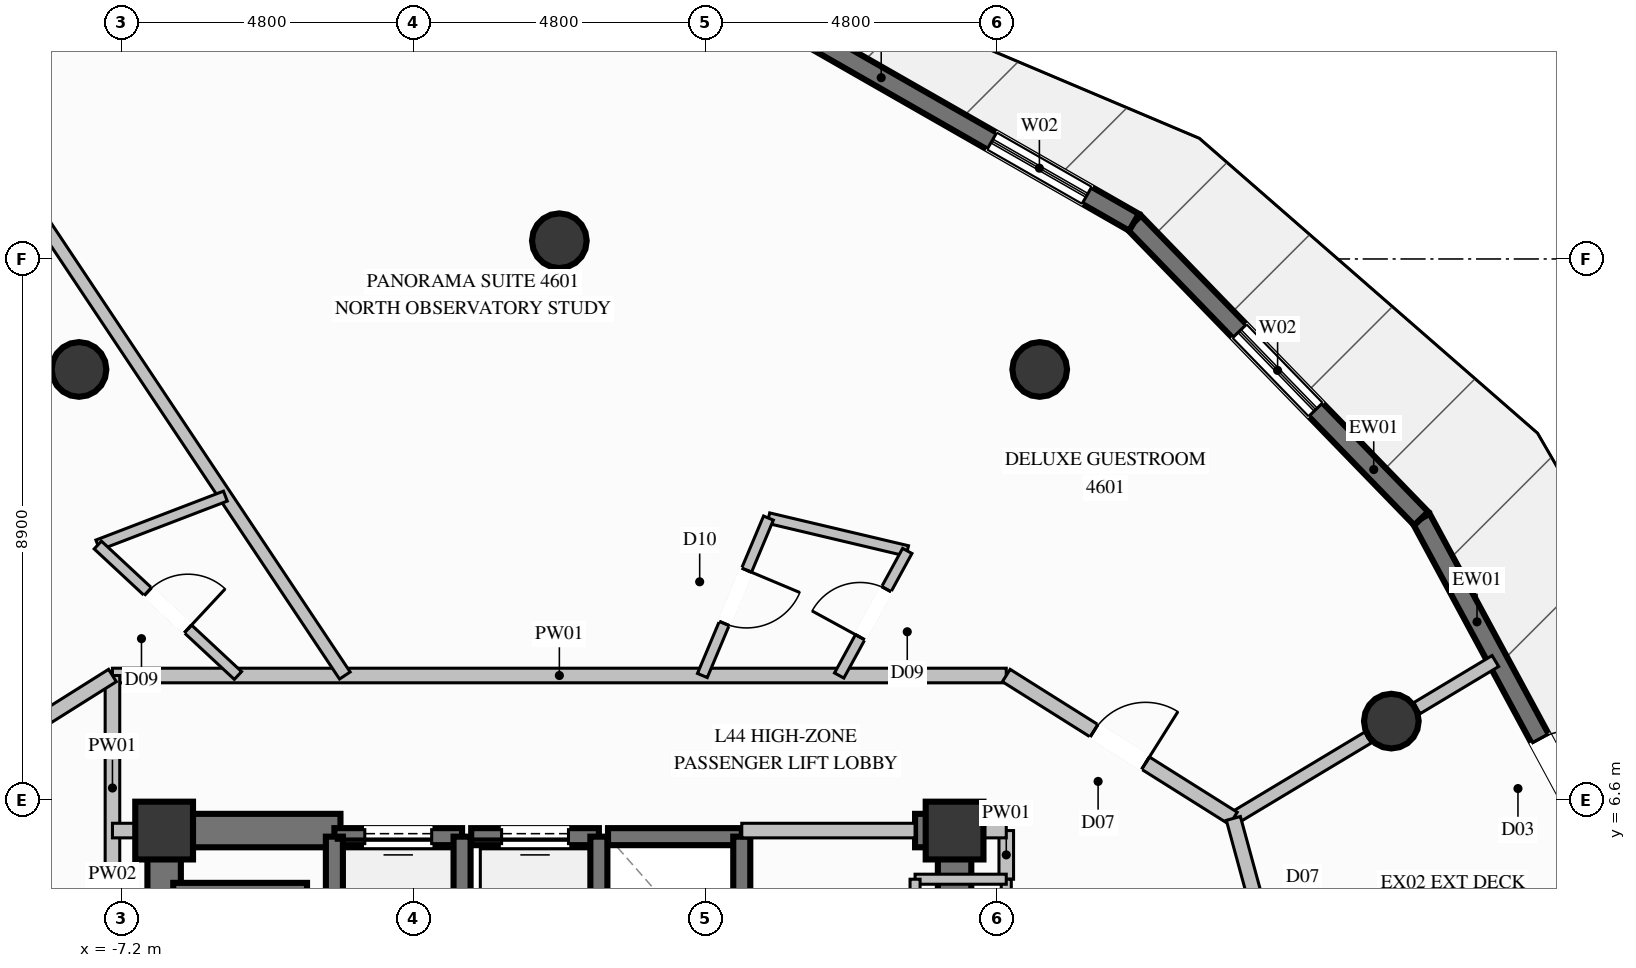
"""IFC4 building model, lengths in metres.
Left out: names, types, materials, properties, quantities, classifications, styles, units other than length and angle.
Written with IfcOpenShell. Run it as: python <this file> out.ifc"""

import sys

from ifc_helpers import new_model, si_unit, direction, frame, frame_2d, origin, origin_2d, place, context, subcontext, project, spatial, rectangle, circle, extrude, element, fill, save


model = new_model("IFC4")
c1 = context("Model", 3, precision=1e-05, world=origin(), true_north=direction((0.0, 1.0)))
c2 = subcontext(c1, "Body", "Model", "MODEL_VIEW")
j1 = project(units=[si_unit("LENGTHUNIT", "METRE"), si_unit("PLANEANGLEUNIT", "RADIAN")], contexts=[c1])
p1 = place(None, origin())
s1 = spatial("IfcSite", under=j1, at=p1, CompositionType="ELEMENT")
p2 = place(p1, origin())
s2 = spatial("IfcBuilding", under=s1, at=p2, CompositionType="ELEMENT")
p3 = place(p2, frame((0.0, 0.0, 173.2)))
s3 = spatial("IfcBuildingStorey", under=s2, at=p3, CompositionType="ELEMENT", Elevation=173.2)
for number, where, z_axis, x_axis in (
    (1, (6.5, 6.1, 0.0), (0.0, 0.0, 1.0), (1.0, 0.0, 0.0)),
    (2, (-6.5, 6.1, 0.0), (0.0, 0.0, 1.0), (1.0, 0.0, 0.0)),
):
    element("IfcColumn", number, at=place(p3, frame(where, z_axis=z_axis, x_axis=x_axis)), inside=s3, PredefinedType="COLUMN", context=c2, shape_type="SweptSolid", body=[
        extrude(rectangle(XDim=0.95, YDim=0.95, at=origin_2d()), origin(), (0.0, 0.0, 1.0), 3.6),
    ])
p4 = place(p3, frame((-6.225, 6.1, 0.0), z_axis=(0.0, 0.0, 1.0), x_axis=(1.0, 0.0, 0.0)))
e3 = element("IfcWall", 3, at=p4, inside=s3, PredefinedType="SHEAR", context=c2, shape_type="SweptSolid", body=[
    extrude(rectangle(XDim=2.625, YDim=0.55, at=frame_2d((1.312, 0.0))), origin(), (0.0, 0.0, 1.0), 3.6),
])
p5 = place(p3, frame((5.85, 6.1, 0.0), z_axis=(0.0, 0.0, 1.0), x_axis=(1.0, 0.0, 0.0)))
e4 = element("IfcWall", 4, at=p5, inside=s3, PredefinedType="SHEAR", context=c2, shape_type="SweptSolid", body=[
    extrude(rectangle(XDim=0.375, YDim=0.55, at=frame_2d((0.188, 0.0))), origin(), (0.0, 0.0, 1.0), 3.6),
])
p6 = place(p3, frame((-6.5, 2.35, 0.0), z_axis=(0.0, 0.0, 1.0), x_axis=(0.0, 1.0, 0.0)))
e5 = element("IfcWall", 5, at=p6, inside=s3, PredefinedType="SHEAR", context=c2, shape_type="SweptSolid", body=[
    extrude(rectangle(XDim=4.025, YDim=0.55, at=frame_2d((2.012, 0.0))), origin(), (0.0, 0.0, 1.0), 3.6),
])
p7 = place(p3, frame((6.5, 3.35, 0.0), z_axis=(0.0, 0.0, 1.0), x_axis=(0.0, 1.0, 0.0)))
e6 = element("IfcWall", 6, at=p7, inside=s3, PredefinedType="SHEAR", context=c2, shape_type="SweptSolid", body=[
    extrude(rectangle(XDim=3.025, YDim=0.55, at=frame_2d((1.512, 0.0))), origin(), (0.0, 0.0, 1.0), 3.6),
])
for number, where, z_axis, x_axis in (
    (7, (13.683, 7.9, 0.0), (0.0, 0.0, 1.0), (1.0, 0.0, 0.0)),
    (8, (7.9, 13.683, 0.0), (0.0, 0.0, 1.0), (1.0, 0.0, 0.0)),
    (9, (0.0, 15.8, 0.0), (0.0, 0.0, 1.0), (1.0, 0.0, 0.0)),
    (10, (-7.9, 13.683, 0.0), (0.0, 0.0, 1.0), (1.0, 0.0, 0.0)),
):
    element("IfcColumn", number, at=place(p3, frame(where, z_axis=z_axis, x_axis=x_axis)), inside=s3, PredefinedType="COLUMN", context=c2, shape_type="SweptSolid", body=[
        extrude(circle(Radius=0.45, at=origin_2d()), origin(), (0.0, 0.0, 1.0), 3.6),
    ])
p8 = place(p3, frame((14.174, 11.232, 0.0), z_axis=(0.0, 0.0, 1.0), x_axis=(0.475159501302, -0.879899680829, 0.0)))
e11 = element("IfcWall", 11, at=p8, inside=s3, PredefinedType="SOLIDWALL", context=c2, shape_type="SweptSolid", body=[
    extrude(rectangle(XDim=6.785, YDim=0.32, at=frame_2d((3.393, 0.0))), origin(), (0.0, 0.0, 1.0), 3.36),
])
p9 = place(p8, frame((4.114, 0.0, 0.0)))
e12 = element("IfcOpeningElement", 12, at=p9, cuts=e11, PredefinedType="OPENING", context=c2, shape_type="SweptSolid", body=[
    extrude(rectangle(XDim=1.1, YDim=2.2, at=frame_2d((0.55, 1.1))), frame((0.0, 0.17, 0.0), z_axis=(0.0, -1.0, 0.0), x_axis=(1.0, 0.0, 0.0)), (0.0, 0.0, 1.0), 0.34),
])
p10 = place(p3, frame((9.451, 16.103, 0.0), z_axis=(0.0, 0.0, 1.0), x_axis=(0.696119985346, -0.71792545992, 0.0)))
e13 = element("IfcWall", 13, at=p10, inside=s3, PredefinedType="SOLIDWALL", context=c2, shape_type="SweptSolid", body=[
    extrude(rectangle(XDim=6.785, YDim=0.32, at=frame_2d((3.393, 0.0))), origin(), (0.0, 0.0, 1.0), 3.36),
])
p11 = place(p10, frame((2.492, 0.0, 0.35)))
e14 = element("IfcOpeningElement", 14, at=p11, cuts=e13, PredefinedType="OPENING", context=c2, shape_type="SweptSolid", body=[
    extrude(rectangle(XDim=1.8, YDim=2.6, at=frame_2d((0.9, 1.3))), frame((0.0, 0.17, 0.0), z_axis=(0.0, -1.0, 0.0), x_axis=(1.0, 0.0, 0.0)), (0.0, 0.0, 1.0), 0.34),
])
p12 = place(p3, frame((3.69, 19.398, 0.0), z_axis=(0.0, 0.0, 1.0), x_axis=(0.868052920032, -0.496471678974, 0.0)))
e15 = element("IfcWall", 15, at=p12, inside=s3, PredefinedType="SOLIDWALL", context=c2, shape_type="SweptSolid", body=[
    extrude(rectangle(XDim=6.637, YDim=0.32, at=frame_2d((3.318, 0.0))), origin(), (0.0, 0.0, 1.0), 3.36),
])
p13 = place(p12, frame((3.944, 0.0, 0.35)))
e16 = element("IfcOpeningElement", 16, at=p13, cuts=e15, PredefinedType="OPENING", context=c2, shape_type="SweptSolid", body=[
    extrude(rectangle(XDim=1.8, YDim=2.6, at=frame_2d((0.9, 1.3))), frame((0.0, 0.17, 0.0), z_axis=(0.0, -1.0, 0.0), x_axis=(1.0, 0.0, 0.0)), (0.0, 0.0, 1.0), 0.34),
])
p14 = place(p3, frame((-1.6, 6.0, 0.0), z_axis=(0.0, 0.0, 1.0), x_axis=(-1.0, 0.0, 0.0)))
e17 = element("IfcWall", 17, at=p14, inside=s3, PredefinedType="SOLIDWALL", context=c2, shape_type="SweptSolid", body=[
    extrude(rectangle(XDim=2.1, YDim=0.28, at=frame_2d((1.05, 0.0))), origin(), (0.0, 0.0, 1.0), 3.36),
])
p15 = place(p14, frame((0.5, 0.0, 0.0)))
e18 = element("IfcOpeningElement", 18, at=p15, cuts=e17, PredefinedType="OPENING", context=c2, shape_type="SweptSolid", body=[
    extrude(rectangle(XDim=1.1, YDim=2.2, at=frame_2d((0.55, 1.1))), frame((0.0, 0.15, 0.0), z_axis=(0.0, -1.0, 0.0), x_axis=(1.0, 0.0, 0.0)), (0.0, 0.0, 1.0), 0.3),
])
for number, where, z_axis, x_axis in (
    (19, (-3.7, 6.0, 0.0), (0.0, 0.0, 1.0), (0.0, -1.0, 0.0)),
    (20, (-1.6, 3.5, 0.0), (0.0, 0.0, 1.0), (0.0, 1.0, 0.0)),
):
    element("IfcWall", number, at=place(p3, frame(where, z_axis=z_axis, x_axis=x_axis)), inside=s3, PredefinedType="SOLIDWALL", context=c2, shape_type="SweptSolid", body=[
        extrude(rectangle(XDim=2.5, YDim=0.28, at=frame_2d((1.25, 0.0))), origin(), (0.0, 0.0, 1.0), 3.36),
    ])
p16 = place(p3, frame((0.65, 6.0, 0.0), z_axis=(0.0, 0.0, 1.0), x_axis=(-1.0, 0.0, 0.0)))
e21 = element("IfcWall", 21, at=p16, inside=s3, PredefinedType="SOLIDWALL", context=c2, shape_type="SweptSolid", body=[
    extrude(rectangle(XDim=2.1, YDim=0.28, at=frame_2d((1.05, 0.0))), origin(), (0.0, 0.0, 1.0), 3.36),
])
p17 = place(p16, frame((0.5, 0.0, 0.0)))
e22 = element("IfcOpeningElement", 22, at=p17, cuts=e21, PredefinedType="OPENING", context=c2, shape_type="SweptSolid", body=[
    extrude(rectangle(XDim=1.1, YDim=2.2, at=frame_2d((0.55, 1.1))), frame((0.0, 0.15, 0.0), z_axis=(0.0, -1.0, 0.0), x_axis=(1.0, 0.0, 0.0)), (0.0, 0.0, 1.0), 0.3),
])
p18 = place(p3, frame((0.65, 3.5, 0.0), z_axis=(0.0, 0.0, 1.0), x_axis=(0.0, 1.0, 0.0)))
e23 = element("IfcWall", 23, at=p18, inside=s3, PredefinedType="SOLIDWALL", context=c2, shape_type="SweptSolid", body=[
    extrude(rectangle(XDim=2.5, YDim=0.28, at=frame_2d((1.25, 0.0))), origin(), (0.0, 0.0, 1.0), 3.36),
])
p19 = place(p3, frame((3.0, 6.0, 0.0), z_axis=(0.0, 0.0, 1.0), x_axis=(-1.0, 0.0, 0.0)))
e24 = element("IfcWall", 24, at=p19, inside=s3, PredefinedType="SOLIDWALL", context=c2, shape_type="SweptSolid", body=[
    extrude(rectangle(XDim=2.2, YDim=0.28, at=frame_2d((1.1, 0.0))), origin(), (0.0, 0.0, 1.0), 3.36),
])
p20 = place(p3, frame((3.0, 3.5, 0.0), z_axis=(0.0, 0.0, 1.0), x_axis=(0.0, 1.0, 0.0)))
e25 = element("IfcWall", 25, at=p20, inside=s3, PredefinedType="SOLIDWALL", context=c2, shape_type="SweptSolid", body=[
    extrude(rectangle(XDim=2.5, YDim=0.28, at=frame_2d((1.25, 0.0))), origin(), (0.0, 0.0, 1.0), 3.36),
])
p21 = place(p3, frame((-4.15, 5.1, 0.0), z_axis=(0.0, 0.0, 1.0), x_axis=(-1.0, 0.0, 0.0)))
e26 = element("IfcWall", 26, at=p21, inside=s3, PredefinedType="SOLIDWALL", context=c2, shape_type="SweptSolid", body=[
    extrude(rectangle(XDim=2.2, YDim=0.28, at=frame_2d((1.1, 0.0))), origin(), (0.0, 0.0, 1.0), 3.36),
])
p22 = place(p3, frame((-7.35, 8.65, 0.0), z_axis=(0.0, 0.0, 1.0), x_axis=(1.0, 0.0, 0.0)))
e27 = element("IfcWall", 27, at=p22, inside=s3, PredefinedType="PARTITIONING", context=c2, shape_type="SweptSolid", body=[
    extrude(rectangle(XDim=14.7, YDim=0.24, at=frame_2d((7.35, 0.0))), origin(), (0.0, 0.0, 1.0), 3.36),
])
p23 = place(p3, frame((3.0, 6.1, 0.0), z_axis=(0.0, 0.0, 1.0), x_axis=(1.0, 0.0, 0.0)))
e28 = element("IfcWall", 28, at=p23, inside=s3, PredefinedType="PARTITIONING", context=c2, shape_type="SweptSolid", body=[
    extrude(rectangle(XDim=2.85, YDim=0.24, at=frame_2d((1.425, 0.0))), origin(), (0.0, 0.0, 1.0), 2.445),
])
p24 = place(p3, frame((7.35, 5.3, 0.0), z_axis=(0.0, 0.0, 1.0), x_axis=(0.0, 1.0, 0.0)))
e29 = element("IfcWall", 29, at=p24, inside=s3, PredefinedType="PARTITIONING", context=c2, shape_type="SweptSolid", body=[
    extrude(rectangle(XDim=0.8, YDim=0.24, at=frame_2d((0.4, 0.0))), origin(), (0.0, 0.0, 1.0), 2.445),
])
p25 = place(p3, frame((6.5, 6.1, 0.0), z_axis=(0.0, 0.0, 1.0), x_axis=(1.0, 0.0, 0.0)))
e30 = element("IfcWall", 30, at=p25, inside=s3, PredefinedType="PARTITIONING", context=c2, shape_type="SweptSolid", body=[
    extrude(rectangle(XDim=0.85, YDim=0.24, at=frame_2d((0.425, 0.0))), origin(), (0.0, 0.0, 1.0), 2.801),
])
p26 = place(p3, frame((-7.35, 4.95, 0.0), z_axis=(0.0, 0.0, 1.0), x_axis=(0.0, 1.0, 0.0)))
e31 = element("IfcWall", 31, at=p26, inside=s3, PredefinedType="PARTITIONING", context=c2, shape_type="SweptSolid", body=[
    extrude(rectangle(XDim=3.7, YDim=0.24, at=frame_2d((1.85, 0.0))), origin(), (0.0, 0.0, 1.0), 2.445),
])
p27 = place(p3, frame((-7.35, 6.1, 0.0), z_axis=(0.0, 0.0, 1.0), x_axis=(1.0, 0.0, 0.0)))
e32 = element("IfcWall", 32, at=p27, inside=s3, PredefinedType="PARTITIONING", context=c2, shape_type="SweptSolid", body=[
    extrude(rectangle(XDim=0.85, YDim=0.24, at=frame_2d((0.425, 0.0))), origin(), (0.0, 0.0, 1.0), 2.801),
])
p28 = place(p3, frame((7.35, 2.75, 0.0), z_axis=(0.0, 0.0, 1.0), x_axis=(0.0, 1.0, 0.0)))
e33 = element("IfcWall", 33, at=p28, inside=s3, PredefinedType="PARTITIONING", context=c2, shape_type="SweptSolid", body=[
    extrude(rectangle(XDim=2.55, YDim=0.165, at=frame_2d((1.275, 0.0))), origin(), (0.0, 0.0, 1.0), 3.36),
])
p29 = place(p28, frame((0.8, 0.0, 0.0)))
e34 = element("IfcOpeningElement", 34, at=p29, cuts=e33, PredefinedType="OPENING", context=c2, shape_type="SweptSolid", body=[
    extrude(rectangle(XDim=0.95, YDim=2.1, at=frame_2d((0.475, 1.05))), frame((0.0, 0.093, 0.0), z_axis=(0.0, -1.0, 0.0), x_axis=(1.0, 0.0, 0.0)), (0.0, 0.0, 1.0), 0.185),
])
p30 = place(p3, frame((7.35, 5.3, 0.0), z_axis=(0.0, 0.0, 1.0), x_axis=(-1.0, 0.0, 0.0)))
e35 = element("IfcWall", 35, at=p30, inside=s3, PredefinedType="PARTITIONING", context=c2, shape_type="SweptSolid", body=[
    extrude(rectangle(XDim=1.5, YDim=0.165, at=frame_2d((0.75, 0.0))), origin(), (0.0, 0.0, 1.0), 2.445),
])
p31 = place(p3, frame((5.85, 5.3, 0.0), z_axis=(0.0, 0.0, 1.0), x_axis=(0.0, -1.0, 0.0)))
e36 = element("IfcWall", 36, at=p31, inside=s3, PredefinedType="PARTITIONING", context=c2, shape_type="SweptSolid", body=[
    extrude(rectangle(XDim=2.55, YDim=0.165, at=frame_2d((1.275, 0.0))), origin(), (0.0, 0.0, 1.0), 2.445),
])
p32 = place(p3, frame((11.085, 6.3, 0.0), z_axis=(0.0, 0.0, 1.0), x_axis=(0.857259301733, 0.514884928497, 0.0)))
e37 = element("IfcWall", 37, at=p32, inside=s3, PredefinedType="PARTITIONING", context=c2, shape_type="SweptSolid", body=[
    extrude(rectangle(XDim=2.583, YDim=0.21, at=frame_2d((1.292, 0.0))), origin(), (0.0, 0.0, 1.0), 2.801),
])
p33 = place(p3, frame((14.102, 8.112, 0.0), z_axis=(0.0, 0.0, 1.0), x_axis=(0.85729274583, 0.514829241543, 0.0)))
e38 = element("IfcWall", 38, at=p33, inside=s3, PredefinedType="PARTITIONING", context=c2, shape_type="SweptSolid", body=[
    extrude(rectangle(XDim=1.507, YDim=0.21, at=frame_2d((0.753, 0.0))), origin(), (0.0, 0.0, 1.0), 3.36),
])
p34 = place(p3, frame((3.439, 11.239, 0.0), z_axis=(0.0, 0.0, 1.0), x_axis=(0.973143510765, -0.230199277704, 0.0)))
e39 = element("IfcWall", 39, at=p34, inside=s3, PredefinedType="PLUMBINGWALL", context=c2, shape_type="SweptSolid", body=[
    extrude(rectangle(XDim=2.346, YDim=0.175, at=frame_2d((1.173, 0.0))), origin(), (0.0, 0.0, 1.0), 3.36),
])
p35 = place(p3, frame((3.439, 11.239, 0.0), z_axis=(0.0, 0.0, 1.0), x_axis=(-0.387077273479, -0.922047278807, 0.0)))
e40 = element("IfcWall", 40, at=p35, inside=s3, PredefinedType="PLUMBINGWALL", context=c2, shape_type="SweptSolid", body=[
    extrude(rectangle(XDim=2.808, YDim=0.175, at=frame_2d((1.404, 0.0))), origin(), (0.0, 0.0, 1.0), 3.36),
])
p36 = place(p35, frame((0.929, 0.0, 0.0)))
e41 = element("IfcOpeningElement", 41, at=p36, cuts=e40, PredefinedType="OPENING", context=c2, shape_type="SweptSolid", body=[
    extrude(rectangle(XDim=0.95, YDim=2.1, at=frame_2d((0.475, 1.05))), frame((0.0, 0.098, 0.0), z_axis=(0.0, -1.0, 0.0), x_axis=(1.0, 0.0, 0.0)), (0.0, 0.0, 1.0), 0.195),
])
p37 = place(p3, frame((4.602, 8.65, 0.0), z_axis=(0.0, 0.0, 1.0), x_axis=(0.479577167617, 0.877499709573, 0.0)))
e42 = element("IfcWall", 42, at=p37, inside=s3, PredefinedType="PLUMBINGWALL", context=c2, shape_type="SweptSolid", body=[
    extrude(rectangle(XDim=2.335, YDim=0.175, at=frame_2d((1.167, 0.0))), origin(), (0.0, 0.0, 1.0), 3.36),
])
p38 = place(p37, frame((0.718, 0.0, 0.0)))
e43 = element("IfcOpeningElement", 43, at=p38, cuts=e42, PredefinedType="OPENING", context=c2, shape_type="SweptSolid", body=[
    extrude(rectangle(XDim=0.9, YDim=2.1, at=frame_2d((0.45, 1.05))), frame((0.0, 0.098, 0.0), z_axis=(0.0, -1.0, 0.0), x_axis=(1.0, 0.0, 0.0)), (0.0, 0.0, 1.0), 0.195),
])
p39 = place(p3, frame((7.35, 8.65, 0.0), z_axis=(0.0, 0.0, 1.0), x_axis=(0.846409267484, -0.532532958526, 0.0)))
e44 = element("IfcWall", 44, at=p39, inside=s3, PredefinedType="PARTITIONING", context=c2, shape_type="SweptSolid", body=[
    extrude(rectangle(XDim=4.413, YDim=0.24, at=frame_2d((2.206, 0.0))), origin(), (0.0, 0.0, 1.0), 3.36),
])
p40 = place(p39, frame((1.706, 0.0, 0.0)))
e45 = element("IfcOpeningElement", 45, at=p40, cuts=e44, PredefinedType="OPENING", context=c2, shape_type="SweptSolid", body=[
    extrude(rectangle(XDim=1.0, YDim=2.2, at=frame_2d((0.5, 1.1))), frame((0.0, 0.13, 0.0), z_axis=(0.0, -1.0, 0.0), x_axis=(1.0, 0.0, 0.0)), (0.0, 0.0, 1.0), 0.26),
])
p41 = place(p3, frame((-3.528, 8.65, 0.0), z_axis=(0.0, 0.0, 1.0), x_axis=(-0.554428653403, 0.832231258898, 0.0)))
e46 = element("IfcWall", 46, at=p41, inside=s3, PredefinedType="PARTITIONING", context=c2, shape_type="SweptSolid", body=[
    extrude(rectangle(XDim=12.658, YDim=0.21, at=frame_2d((6.329, 0.0))), origin(), (0.0, 0.0, 1.0), 3.36),
])
p42 = place(p3, frame((-7.591, 10.796, 0.0), z_axis=(0.0, 0.0, 1.0), x_axis=(0.933759431782, 0.357901276273, 0.0)))
e47 = element("IfcWall", 47, at=p42, inside=s3, PredefinedType="PLUMBINGWALL", context=c2, shape_type="SweptSolid", body=[
    extrude(rectangle(XDim=2.247, YDim=0.175, at=frame_2d((1.124, 0.0))), origin(), (0.0, 0.0, 1.0), 3.36),
])
p43 = place(p3, frame((-7.591, 10.796, 0.0), z_axis=(0.0, 0.0, 1.0), x_axis=(0.731925968359, -0.681384162453, 0.0)))
e48 = element("IfcWall", 48, at=p43, inside=s3, PredefinedType="PLUMBINGWALL", context=c2, shape_type="SweptSolid", body=[
    extrude(rectangle(XDim=3.149, YDim=0.175, at=frame_2d((1.575, 0.0))), origin(), (0.0, 0.0, 1.0), 3.36),
])
p44 = place(p43, frame((1.125, 0.0, 0.0)))
e49 = element("IfcOpeningElement", 49, at=p44, cuts=e48, PredefinedType="OPENING", context=c2, shape_type="SweptSolid", body=[
    extrude(rectangle(XDim=0.9, YDim=2.1, at=frame_2d((0.45, 1.05))), frame((0.0, 0.098, 0.0), z_axis=(0.0, -1.0, 0.0), x_axis=(1.0, 0.0, 0.0)), (0.0, 0.0, 1.0), 0.195),
])
p45 = place(p3, frame((-11.085, 6.3, 0.0), z_axis=(0.0, 0.0, 1.0), x_axis=(0.846409267484, 0.532532958526, 0.0)))
e50 = element("IfcWall", 50, at=p45, inside=s3, PredefinedType="PARTITIONING", context=c2, shape_type="SweptSolid", body=[
    extrude(rectangle(XDim=4.413, YDim=0.24, at=frame_2d((2.206, 0.0))), origin(), (0.0, 0.0, 1.0), 3.36),
])
p46 = place(p45, frame((1.706, 0.0, 0.0)))
e51 = element("IfcOpeningElement", 51, at=p46, cuts=e50, PredefinedType="OPENING", context=c2, shape_type="SweptSolid", body=[
    extrude(rectangle(XDim=1.0, YDim=2.2, at=frame_2d((0.5, 1.1))), frame((0.0, 0.13, 0.0), z_axis=(0.0, -1.0, 0.0), x_axis=(1.0, 0.0, 0.0)), (0.0, 0.0, 1.0), 0.26),
])
p47 = place(p3, frame((12.08, 2.646, 0.0), z_axis=(0.0, 0.0, 1.0), x_axis=(-0.262762825819, 0.964860454868, 0.0)))
e52 = element("IfcWall", 52, at=p47, inside=s3, PredefinedType="PARTITIONING", context=c2, shape_type="SweptSolid", body=[
    extrude(rectangle(XDim=3.787, YDim=0.24, at=frame_2d((1.894, 0.0))), origin(), (0.0, 0.0, 1.0), 3.36),
])
p48 = place(p47, frame((1.394, 0.0, 0.0)))
e53 = element("IfcOpeningElement", 53, at=p48, cuts=e52, PredefinedType="OPENING", context=c2, shape_type="SweptSolid", body=[
    extrude(rectangle(XDim=1.0, YDim=2.2, at=frame_2d((0.5, 1.1))), frame((0.0, 0.13, 0.0), z_axis=(0.0, -1.0, 0.0), x_axis=(1.0, 0.0, 0.0)), (0.0, 0.0, 1.0), 0.26),
])
p49 = place(p9, origin())
e54 = element("IfcDoor", 54, at=p49, inside=s3, OperationType="SINGLE_SWING_RIGHT", PredefinedType="DOOR", context=c2, shape_type="SweptSolid", body=[
    extrude(rectangle(XDim=1.1, YDim=2.2, at=frame_2d((0.55, 1.1))), frame((0.0, 0.025, 0.0), z_axis=(0.0, -1.0, 0.0), x_axis=(1.0, 0.0, 0.0)), (0.0, 0.0, 1.0), 0.05),
])
fill(e12, e54)
p50 = place(p11, origin())
e55 = element("IfcWindow", 55, at=p50, inside=s3, PartitioningType="SINGLE_PANEL", PredefinedType="WINDOW", context=c2, shape_type="SweptSolid", body=[
    extrude(rectangle(XDim=1.8, YDim=2.6, at=frame_2d((0.9, 1.3))), frame((0.0, 0.03, 0.0), z_axis=(0.0, -1.0, 0.0), x_axis=(1.0, 0.0, 0.0)), (0.0, 0.0, 1.0), 0.06),
])
fill(e14, e55)
p51 = place(p13, origin())
e56 = element("IfcWindow", 56, at=p51, inside=s3, PartitioningType="SINGLE_PANEL", PredefinedType="WINDOW", context=c2, shape_type="SweptSolid", body=[
    extrude(rectangle(XDim=1.8, YDim=2.6, at=frame_2d((0.9, 1.3))), frame((0.0, 0.03, 0.0), z_axis=(0.0, -1.0, 0.0), x_axis=(1.0, 0.0, 0.0)), (0.0, 0.0, 1.0), 0.06),
])
fill(e16, e56)
p52 = place(p15, origin())
e57 = element("IfcDoor", 57, at=p52, inside=s3, OperationType="SLIDING_TO_LEFT", PredefinedType="DOOR", context=c2, shape_type="SweptSolid", body=[
    extrude(rectangle(XDim=1.1, YDim=2.2, at=frame_2d((0.55, 1.1))), frame((0.0, 0.025, 0.0), z_axis=(0.0, -1.0, 0.0), x_axis=(1.0, 0.0, 0.0)), (0.0, 0.0, 1.0), 0.05),
])
fill(e18, e57)
p53 = place(p17, origin())
e58 = element("IfcDoor", 58, at=p53, inside=s3, OperationType="SLIDING_TO_LEFT", PredefinedType="DOOR", context=c2, shape_type="SweptSolid", body=[
    extrude(rectangle(XDim=1.1, YDim=2.2, at=frame_2d((0.55, 1.1))), frame((0.0, 0.025, 0.0), z_axis=(0.0, -1.0, 0.0), x_axis=(1.0, 0.0, 0.0)), (0.0, 0.0, 1.0), 0.05),
])
fill(e22, e58)
p54 = place(p38, origin())
e59 = element("IfcDoor", 59, at=p54, inside=s3, OperationType="SINGLE_SWING_LEFT", PredefinedType="DOOR", context=c2, shape_type="SweptSolid", body=[
    extrude(rectangle(XDim=0.9, YDim=2.1, at=frame_2d((0.45, 1.05))), frame((0.0, 0.025, 0.0), z_axis=(0.0, -1.0, 0.0), x_axis=(1.0, 0.0, 0.0)), (0.0, 0.0, 1.0), 0.05),
])
fill(e43, e59)
p55 = place(p40, origin())
e60 = element("IfcDoor", 60, at=p55, inside=s3, OperationType="SINGLE_SWING_RIGHT", PredefinedType="DOOR", context=c2, shape_type="SweptSolid", body=[
    extrude(rectangle(XDim=1.0, YDim=2.2, at=frame_2d((0.5, 1.1))), frame((0.0, 0.025, 0.0), z_axis=(0.0, -1.0, 0.0), x_axis=(1.0, 0.0, 0.0)), (0.0, 0.0, 1.0), 0.05),
])
fill(e45, e60)
p56 = place(p36, origin())
e61 = element("IfcDoor", 61, at=p56, inside=s3, OperationType="SINGLE_SWING_LEFT", PredefinedType="DOOR", context=c2, shape_type="SweptSolid", body=[
    extrude(rectangle(XDim=0.95, YDim=2.1, at=frame_2d((0.475, 1.05))), frame((0.0, 0.025, 0.0), z_axis=(0.0, -1.0, 0.0), x_axis=(1.0, 0.0, 0.0)), (0.0, 0.0, 1.0), 0.05),
])
fill(e41, e61)
p57 = place(p44, origin())
e62 = element("IfcDoor", 62, at=p57, inside=s3, OperationType="SINGLE_SWING_RIGHT", PredefinedType="DOOR", context=c2, shape_type="SweptSolid", body=[
    extrude(rectangle(XDim=0.9, YDim=2.1, at=frame_2d((0.45, 1.05))), frame((0.0, 0.025, 0.0), z_axis=(0.0, -1.0, 0.0), x_axis=(1.0, 0.0, 0.0)), (0.0, 0.0, 1.0), 0.05),
])
fill(e49, e62)
save(model, sys.argv[1])
